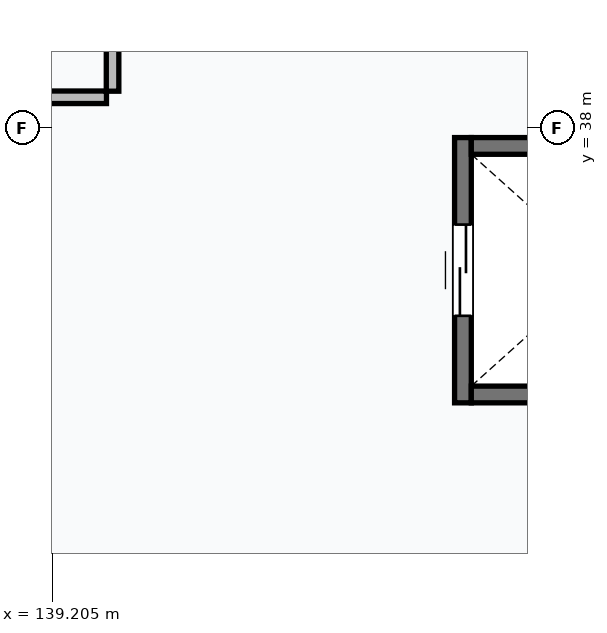
"""IFC4 building model, lengths in metres.
Left out: names, types, materials, properties, quantities, classifications, styles, units other than length and angle.
Written with IfcOpenShell. Run it as: python <this file> out.ifc"""

import sys

from ifc_helpers import new_model, si_unit, direction, frame, frame_2d, origin, place, context, subcontext, project, spatial, rectangle, extrude, element, fill, save


model = new_model("IFC4")
c1 = context("Model", 3, precision=1e-05, world=origin(), true_north=direction((0.0, 1.0)))
c2 = subcontext(c1, "Body", "Model", "MODEL_VIEW")
j1 = project(units=[si_unit("LENGTHUNIT", "METRE"), si_unit("PLANEANGLEUNIT", "RADIAN")], contexts=[c1])
p1 = place(None, origin())
s1 = spatial("IfcSite", under=j1, at=p1, CompositionType="ELEMENT")
p2 = place(p1, origin())
s2 = spatial("IfcBuilding", under=s1, at=p2, CompositionType="ELEMENT")
p3 = place(p2, frame((0.0, 0.0, 12.0)))
s3 = spatial("IfcBuildingStorey", under=s2, at=p3, CompositionType="ELEMENT", Elevation=12.0)
p4 = place(p3, frame((144.61, 34.38, 0.0), z_axis=(0.0, 0.0, 1.0), x_axis=(0.0, 1.0, 0.0)))
e1 = element("IfcWall", 1, at=p4, inside=s3, PredefinedType="SHEAR", context=c2, shape_type="SweptSolid", body=[
    extrude(rectangle(XDim=3.49, YDim=0.22, at=frame_2d((1.745, 0.0))), origin(), (0.0, 0.0, 1.0), 3.6),
])
p5 = place(p4, frame((1.145, 0.0, 0.0)))
e2 = element("IfcOpeningElement", 2, at=p5, cuts=e1, PredefinedType="OPENING", context=c2, shape_type="SweptSolid", body=[
    extrude(rectangle(XDim=1.2, YDim=2.2, at=frame_2d((0.6, 1.1))), frame((0.0, 0.12, 0.0), z_axis=(0.0, -1.0, 0.0), x_axis=(1.0, 0.0, 0.0)), (0.0, 0.0, 1.0), 0.24),
])
for number, where, z_axis, x_axis in (
    (3, (148.12, 34.49, 0.0), (0.0, 0.0, 1.0), (-1.0, 0.0, 0.0)),
    (4, (144.72, 37.76, 0.0), (0.0, 0.0, 1.0), (1.0, 0.0, 0.0)),
):
    element("IfcWall", number, at=place(p3, frame(where, z_axis=z_axis, x_axis=x_axis)), inside=s3, PredefinedType="SHEAR", context=c2, shape_type="SweptSolid", body=[
        extrude(rectangle(XDim=3.4, YDim=0.22, at=frame_2d((1.7, 0.0))), origin(), (0.0, 0.0, 1.0), 3.6),
    ])
p6 = place(p3, frame((132.08, 38.4, 0.0), z_axis=(0.0, 0.0, 1.0), x_axis=(1.0, 0.0, 0.0)))
e5 = element("IfcWall", 5, at=p6, inside=s3, PredefinedType="PARTITIONING", context=c2, shape_type="SweptSolid", body=[
    extrude(rectangle(XDim=7.84, YDim=0.165, at=frame_2d((3.92, 0.0))), origin(), (0.0, 0.0, 1.0), 3.345),
])
p7 = place(p3, frame((140.0, 38.48, 0.0), z_axis=(0.0, 0.0, 1.0), x_axis=(0.0, 1.0, 0.0)))
e6 = element("IfcWall", 6, at=p7, inside=s3, PredefinedType="PARTITIONING", context=c2, shape_type="SweptSolid", body=[
    extrude(rectangle(XDim=13.44, YDim=0.165, at=frame_2d((6.72, 0.0))), origin(), (0.0, 0.0, 1.0), 2.495),
])
p8 = place(p5, origin())
e7 = element("IfcDoor", 7, at=p8, inside=s3, OperationType="DOUBLE_DOOR_SLIDING", PredefinedType="DOOR", context=c2, shape_type="SweptSolid", body=[
    extrude(rectangle(XDim=1.2, YDim=2.2, at=frame_2d((0.6, 1.1))), frame((0.0, 0.025, 0.0), z_axis=(0.0, -1.0, 0.0), x_axis=(1.0, 0.0, 0.0)), (0.0, 0.0, 1.0), 0.05),
])
fill(e2, e7)
save(model, sys.argv[1])
